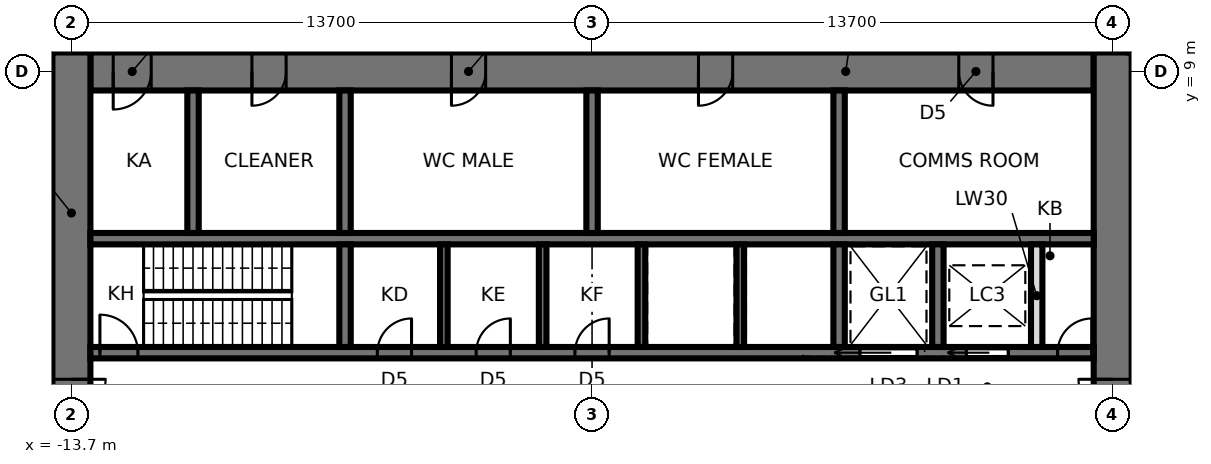
"""IFC4 building model, lengths in metres.
Left out: names, types, materials, properties, quantities, classifications, styles, units other than length and angle.
Written with IfcOpenShell. Run it as: python <this file> out.ifc"""

import sys

from ifc_helpers import new_model, si_unit, direction, frame, frame_2d, origin, place, context, subcontext, project, spatial, rectangle, extrude, element, fill, save


model = new_model("IFC4")
c1 = context("Model", 3, precision=1e-05, world=origin(), true_north=direction((0.0, 1.0)))
c2 = subcontext(c1, "Body", "Model", "MODEL_VIEW")
j1 = project(units=[si_unit("LENGTHUNIT", "METRE"), si_unit("PLANEANGLEUNIT", "RADIAN")], contexts=[c1])
p1 = place(None, origin())
s1 = spatial("IfcSite", under=j1, at=p1, CompositionType="ELEMENT")
p2 = place(p1, origin())
s2 = spatial("IfcBuilding", under=s1, at=p2, CompositionType="ELEMENT")
p3 = place(p2, frame((0.0, 0.0, 166.5)))
s3 = spatial("IfcBuildingStorey", under=s2, at=p3, CompositionType="ELEMENT", Elevation=166.5)
p4 = place(p3, frame((13.2, 9.0, 0.0), z_axis=(0.0, 0.0, 1.0), x_axis=(-1.0, 0.0, 0.0)))
e1 = element("IfcWall", 1, at=p4, inside=s3, PredefinedType="SHEAR", context=c2, shape_type="SweptSolid", body=[
    extrude(rectangle(XDim=26.4, YDim=1.0, at=frame_2d((13.2, 0.0))), origin(), (0.0, 0.0, 1.0), 5.6),
])
p5 = place(p4, frame((2.65, 0.0, 0.0)))
e2 = element("IfcOpeningElement", 2, at=p5, cuts=e1, PredefinedType="OPENING", context=c2, shape_type="SweptSolid", body=[
    extrude(rectangle(XDim=0.9, YDim=2.1, at=frame_2d((0.45, 1.05))), frame((0.0, 0.51, 0.0), z_axis=(0.0, -1.0, 0.0), x_axis=(1.0, 0.0, 0.0)), (0.0, 0.0, 1.0), 1.02),
])
p6 = place(p4, frame((9.5, 0.0, 0.0)))
e3 = element("IfcOpeningElement", 3, at=p6, cuts=e1, PredefinedType="OPENING", context=c2, shape_type="SweptSolid", body=[
    extrude(rectangle(XDim=0.9, YDim=2.1, at=frame_2d((0.45, 1.05))), frame((0.0, 0.51, 0.0), z_axis=(0.0, -1.0, 0.0), x_axis=(1.0, 0.0, 0.0)), (0.0, 0.0, 1.0), 1.02),
])
p7 = place(p4, frame((16.0, 0.0, 0.0)))
e4 = element("IfcOpeningElement", 4, at=p7, cuts=e1, PredefinedType="OPENING", context=c2, shape_type="SweptSolid", body=[
    extrude(rectangle(XDim=0.9, YDim=2.1, at=frame_2d((0.45, 1.05))), frame((0.0, 0.51, 0.0), z_axis=(0.0, -1.0, 0.0), x_axis=(1.0, 0.0, 0.0)), (0.0, 0.0, 1.0), 1.02),
])
p8 = place(p4, frame((21.25, 0.0, 0.0)))
e5 = element("IfcOpeningElement", 5, at=p8, cuts=e1, PredefinedType="OPENING", context=c2, shape_type="SweptSolid", body=[
    extrude(rectangle(XDim=0.9, YDim=2.1, at=frame_2d((0.45, 1.05))), frame((0.0, 0.51, 0.0), z_axis=(0.0, -1.0, 0.0), x_axis=(1.0, 0.0, 0.0)), (0.0, 0.0, 1.0), 1.02),
])
p9 = place(p4, frame((24.8, 0.0, 0.0)))
e6 = element("IfcOpeningElement", 6, at=p9, cuts=e1, PredefinedType="OPENING", context=c2, shape_type="SweptSolid", body=[
    extrude(rectangle(XDim=1.0, YDim=2.1, at=frame_2d((0.5, 1.05))), frame((0.0, 0.51, 0.0), z_axis=(0.0, -1.0, 0.0), x_axis=(1.0, 0.0, 0.0)), (0.0, 0.0, 1.0), 1.02),
])
p10 = place(p3, frame((13.7, -9.5, 0.0), z_axis=(0.0, 0.0, 1.0), x_axis=(0.0, 1.0, 0.0)))
e7 = element("IfcWall", 7, at=p10, inside=s3, PredefinedType="SHEAR", context=c2, shape_type="SweptSolid", body=[
    extrude(rectangle(XDim=19.0, YDim=1.0, at=frame_2d((9.5, 0.0))), origin(), (0.0, 0.0, 1.0), 5.6),
])
p11 = place(p10, frame((8.6, 0.0, 0.0)))
e8 = element("IfcOpeningElement", 8, at=p11, cuts=e7, PredefinedType="OPENING", context=c2, shape_type="SweptSolid", body=[
    extrude(rectangle(XDim=1.8, YDim=2.4, at=frame_2d((0.9, 1.2))), frame((0.0, 0.51, 0.0), z_axis=(0.0, -1.0, 0.0), x_axis=(1.0, 0.0, 0.0)), (0.0, 0.0, 1.0), 1.02),
])
p12 = place(p3, frame((-13.7, 9.5, 0.0), z_axis=(0.0, 0.0, 1.0), x_axis=(0.0, -1.0, 0.0)))
e9 = element("IfcWall", 9, at=p12, inside=s3, PredefinedType="SHEAR", context=c2, shape_type="SweptSolid", body=[
    extrude(rectangle(XDim=19.0, YDim=1.0, at=frame_2d((9.5, 0.0))), origin(), (0.0, 0.0, 1.0), 5.6),
])
p13 = place(p12, frame((8.6, 0.0, 0.0)))
e10 = element("IfcOpeningElement", 10, at=p13, cuts=e9, PredefinedType="OPENING", context=c2, shape_type="SweptSolid", body=[
    extrude(rectangle(XDim=1.8, YDim=2.4, at=frame_2d((0.9, 1.2))), frame((0.0, 0.51, 0.0), z_axis=(0.0, -1.0, 0.0), x_axis=(1.0, 0.0, 0.0)), (0.0, 0.0, 1.0), 1.02),
])
p14 = place(p3, frame((-13.2, 1.6, 0.0), z_axis=(0.0, 0.0, 1.0), x_axis=(1.0, 0.0, 0.0)))
e11 = element("IfcWall", 11, at=p14, inside=s3, PredefinedType="SHEAR", context=c2, shape_type="SweptSolid", body=[
    extrude(rectangle(XDim=26.4, YDim=0.3, at=frame_2d((13.2, 0.0))), origin(), (0.0, 0.0, 1.0), 5.6),
])
p15 = place(p14, frame((0.25, 0.0, 0.0)))
e12 = element("IfcOpeningElement", 12, at=p15, cuts=e11, PredefinedType="OPENING", context=c2, shape_type="SweptSolid", body=[
    extrude(rectangle(XDim=1.0, YDim=2.1, at=frame_2d((0.5, 1.05))), frame((0.0, 0.16, 0.0), z_axis=(0.0, -1.0, 0.0), x_axis=(1.0, 0.0, 0.0)), (0.0, 0.0, 1.0), 0.32),
])
p16 = place(p14, frame((23.05, 0.0, 0.0)))
e13 = element("IfcOpeningElement", 13, at=p16, cuts=e11, PredefinedType="OPENING", context=c2, shape_type="SweptSolid", body=[
    extrude(rectangle(XDim=1.1, YDim=2.3, at=frame_2d((0.55, 1.15))), frame((0.0, 0.16, 0.0), z_axis=(0.0, -1.0, 0.0), x_axis=(1.0, 0.0, 0.0)), (0.0, 0.0, 1.0), 0.32),
])
p17 = place(p14, frame((20.25, 0.0, 0.0)))
e14 = element("IfcOpeningElement", 14, at=p17, cuts=e11, PredefinedType="OPENING", context=c2, shape_type="SweptSolid", body=[
    extrude(rectangle(XDim=1.5, YDim=2.4, at=frame_2d((0.75, 1.2))), frame((0.0, 0.16, 0.0), z_axis=(0.0, -1.0, 0.0), x_axis=(1.0, 0.0, 0.0)), (0.0, 0.0, 1.0), 0.32),
])
p18 = place(p14, frame((7.55, 0.0, 0.0)))
e15 = element("IfcOpeningElement", 15, at=p18, cuts=e11, PredefinedType="OPENING", context=c2, shape_type="SweptSolid", body=[
    extrude(rectangle(XDim=0.9, YDim=2.1, at=frame_2d((0.45, 1.05))), frame((0.0, 0.16, 0.0), z_axis=(0.0, -1.0, 0.0), x_axis=(1.0, 0.0, 0.0)), (0.0, 0.0, 1.0), 0.32),
])
p19 = place(p14, frame((10.15, 0.0, 0.0)))
e16 = element("IfcOpeningElement", 16, at=p19, cuts=e11, PredefinedType="OPENING", context=c2, shape_type="SweptSolid", body=[
    extrude(rectangle(XDim=0.9, YDim=2.1, at=frame_2d((0.45, 1.05))), frame((0.0, 0.16, 0.0), z_axis=(0.0, -1.0, 0.0), x_axis=(1.0, 0.0, 0.0)), (0.0, 0.0, 1.0), 0.32),
])
p20 = place(p14, frame((12.75, 0.0, 0.0)))
e17 = element("IfcOpeningElement", 17, at=p20, cuts=e11, PredefinedType="OPENING", context=c2, shape_type="SweptSolid", body=[
    extrude(rectangle(XDim=0.9, YDim=2.1, at=frame_2d((0.45, 1.05))), frame((0.0, 0.16, 0.0), z_axis=(0.0, -1.0, 0.0), x_axis=(1.0, 0.0, 0.0)), (0.0, 0.0, 1.0), 0.32),
])
p21 = place(p14, frame((25.45, 0.0, 0.0)))
e18 = element("IfcOpeningElement", 18, at=p21, cuts=e11, PredefinedType="OPENING", context=c2, shape_type="SweptSolid", body=[
    extrude(rectangle(XDim=0.9, YDim=2.1, at=frame_2d((0.45, 1.05))), frame((0.0, 0.16, 0.0), z_axis=(0.0, -1.0, 0.0), x_axis=(1.0, 0.0, 0.0)), (0.0, 0.0, 1.0), 0.32),
])
p22 = place(p3, frame((-13.2, 4.6, 0.0), z_axis=(0.0, 0.0, 1.0), x_axis=(1.0, 0.0, 0.0)))
e19 = element("IfcWall", 19, at=p22, inside=s3, PredefinedType="SHEAR", context=c2, shape_type="SweptSolid", body=[
    extrude(rectangle(XDim=26.4, YDim=0.3, at=frame_2d((13.2, 0.0))), origin(), (0.0, 0.0, 1.0), 5.6),
])
p23 = place(p3, frame((-6.5, 1.75, 0.0), z_axis=(0.0, 0.0, 1.0), x_axis=(0.0, 1.0, 0.0)))
e20 = element("IfcWall", 20, at=p23, inside=s3, PredefinedType="SHEAR", context=c2, shape_type="SweptSolid", body=[
    extrude(rectangle(XDim=2.7, YDim=0.3, at=frame_2d((1.35, 0.0))), origin(), (0.0, 0.0, 1.0), 5.6),
])
p24 = place(p3, frame((-6.5, 4.75, 0.0), z_axis=(0.0, 0.0, 1.0), x_axis=(0.0, 1.0, 0.0)))
e21 = element("IfcWall", 21, at=p24, inside=s3, PredefinedType="SHEAR", context=c2, shape_type="SweptSolid", body=[
    extrude(rectangle(XDim=3.75, YDim=0.3, at=frame_2d((1.875, 0.0))), origin(), (0.0, 0.0, 1.0), 5.6),
])
p25 = place(p3, frame((6.5, 1.75, 0.0), z_axis=(0.0, 0.0, 1.0), x_axis=(0.0, 1.0, 0.0)))
e22 = element("IfcWall", 22, at=p25, inside=s3, PredefinedType="SHEAR", context=c2, shape_type="SweptSolid", body=[
    extrude(rectangle(XDim=2.7, YDim=0.3, at=frame_2d((1.35, 0.0))), origin(), (0.0, 0.0, 1.0), 5.6),
])
p26 = place(p3, frame((6.5, 4.75, 0.0), z_axis=(0.0, 0.0, 1.0), x_axis=(0.0, 1.0, 0.0)))
e23 = element("IfcWall", 23, at=p26, inside=s3, PredefinedType="SHEAR", context=c2, shape_type="SweptSolid", body=[
    extrude(rectangle(XDim=3.75, YDim=0.3, at=frame_2d((1.875, 0.0))), origin(), (0.0, 0.0, 1.0), 5.6),
])
for number, where, z_axis, x_axis in (
    (24, (-3.9, 1.75, 0.0), (0.0, 0.0, 1.0), (0.0, 1.0, 0.0)),
    (25, (-1.3, 1.75, 0.0), (0.0, 0.0, 1.0), (0.0, 1.0, 0.0)),
    (26, (1.3, 1.75, 0.0), (0.0, 0.0, 1.0), (0.0, 1.0, 0.0)),
    (27, (3.9, 1.75, 0.0), (0.0, 0.0, 1.0), (0.0, 1.0, 0.0)),
):
    element("IfcWall", number, at=place(p3, frame(where, z_axis=z_axis, x_axis=x_axis)), inside=s3, PredefinedType="SHEAR", context=c2, shape_type="SweptSolid", body=[
        extrude(rectangle(XDim=2.7, YDim=0.2, at=frame_2d((1.35, 0.0))), origin(), (0.0, 0.0, 1.0), 5.6),
    ])
for number, where, z_axis, x_axis in (
    (28, (0.0, 4.75, 0.0), (0.0, 0.0, 1.0), (0.0, 1.0, 0.0)),
    (29, (-10.5, 4.75, 0.0), (0.0, 0.0, 1.0), (0.0, 1.0, 0.0)),
):
    element("IfcWall", number, at=place(p3, frame(where, z_axis=z_axis, x_axis=x_axis)), inside=s3, PredefinedType="SHEAR", context=c2, shape_type="SweptSolid", body=[
        extrude(rectangle(XDim=3.75, YDim=0.3, at=frame_2d((1.875, 0.0))), origin(), (0.0, 0.0, 1.0), 5.6),
    ])
p27 = place(p3, frame((9.1, 1.75, 0.0), z_axis=(0.0, 0.0, 1.0), x_axis=(0.0, 1.0, 0.0)))
e30 = element("IfcWall", 30, at=p27, inside=s3, PredefinedType="SHEAR", context=c2, shape_type="SweptSolid", body=[
    extrude(rectangle(XDim=2.7, YDim=0.3, at=frame_2d((1.35, 0.0))), origin(), (0.0, 0.0, 1.0), 5.6),
])
p28 = place(p3, frame((11.7, 1.75, 0.0), z_axis=(0.0, 0.0, 1.0), x_axis=(0.0, 1.0, 0.0)))
e31 = element("IfcWall", 31, at=p28, inside=s3, PredefinedType="SOLIDWALL", context=c2, shape_type="SweptSolid", body=[
    extrude(rectangle(XDim=2.7, YDim=0.3, at=frame_2d((1.35, 0.0))), origin(), (0.0, 0.0, 1.0), 5.4),
])
p29 = place(p3, frame((14.2, 9.5, 0.0), z_axis=(0.0, 0.0, 1.0), x_axis=(0.0, 1.0, 0.0)))
e32 = element("IfcWall", 32, at=p29, inside=s3, PredefinedType="PARTITIONING", context=c2, shape_type="SweptSolid", body=[
    extrude(rectangle(XDim=1.8, YDim=0.15, at=frame_2d((0.9, 0.0))), origin(), (0.0, 0.0, 1.0), 5.4),
])
p30 = place(p13, origin())
e33 = element("IfcDoor", 33, at=p30, inside=s3, OperationType="DOUBLE_DOOR_SINGLE_SWING", PredefinedType="DOOR", context=c2, shape_type="SweptSolid", body=[
    extrude(rectangle(XDim=1.72, YDim=2.36, at=frame_2d((0.9, 1.18))), frame((0.0, 0.025, 0.0), z_axis=(0.0, -1.0, 0.0), x_axis=(1.0, 0.0, 0.0)), (0.0, 0.0, 1.0), 0.05),
    extrude(rectangle(XDim=0.04, YDim=2.4, at=frame_2d((0.02, 1.2))), frame((0.0, 0.25, 0.0), z_axis=(0.0, -1.0, 0.0), x_axis=(1.0, 0.0, 0.0)), (0.0, 0.0, 1.0), 0.5),
    extrude(rectangle(XDim=0.04, YDim=2.4, at=frame_2d((1.78, 1.2))), frame((0.0, 0.25, 0.0), z_axis=(0.0, -1.0, 0.0), x_axis=(1.0, 0.0, 0.0)), (0.0, 0.0, 1.0), 0.5),
    extrude(rectangle(XDim=1.72, YDim=0.04, at=frame_2d((0.9, 2.38))), frame((0.0, 0.25, 0.0), z_axis=(0.0, -1.0, 0.0), x_axis=(1.0, 0.0, 0.0)), (0.0, 0.0, 1.0), 0.5),
])
fill(e10, e33)
p31 = place(p11, origin())
e34 = element("IfcDoor", 34, at=p31, inside=s3, OperationType="DOUBLE_DOOR_SINGLE_SWING", PredefinedType="DOOR", context=c2, shape_type="SweptSolid", body=[
    extrude(rectangle(XDim=1.72, YDim=2.36, at=frame_2d((0.9, 1.18))), frame((0.0, 0.025, 0.0), z_axis=(0.0, -1.0, 0.0), x_axis=(1.0, 0.0, 0.0)), (0.0, 0.0, 1.0), 0.05),
    extrude(rectangle(XDim=0.04, YDim=2.4, at=frame_2d((0.02, 1.2))), frame((0.0, 0.25, 0.0), z_axis=(0.0, -1.0, 0.0), x_axis=(1.0, 0.0, 0.0)), (0.0, 0.0, 1.0), 0.5),
    extrude(rectangle(XDim=0.04, YDim=2.4, at=frame_2d((1.78, 1.2))), frame((0.0, 0.25, 0.0), z_axis=(0.0, -1.0, 0.0), x_axis=(1.0, 0.0, 0.0)), (0.0, 0.0, 1.0), 0.5),
    extrude(rectangle(XDim=1.72, YDim=0.04, at=frame_2d((0.9, 2.38))), frame((0.0, 0.25, 0.0), z_axis=(0.0, -1.0, 0.0), x_axis=(1.0, 0.0, 0.0)), (0.0, 0.0, 1.0), 0.5),
])
fill(e8, e34)
p32 = place(p15, origin())
e35 = element("IfcDoor", 35, at=p32, inside=s3, OperationType="SINGLE_SWING_LEFT", PredefinedType="DOOR", context=c2, shape_type="SweptSolid", body=[
    extrude(rectangle(XDim=1.0, YDim=2.1, at=frame_2d((0.5, 1.05))), frame((0.0, 0.025, 0.0), z_axis=(0.0, -1.0, 0.0), x_axis=(1.0, 0.0, 0.0)), (0.0, 0.0, 1.0), 0.05),
])
fill(e12, e35)
p33 = place(p16, origin())
e36 = element("IfcDoor", 36, at=p33, inside=s3, OperationType="SLIDING_TO_LEFT", PredefinedType="DOOR", context=c2, shape_type="SweptSolid", body=[
    extrude(rectangle(XDim=1.1, YDim=2.3, at=frame_2d((0.55, 1.15))), frame((0.0, 0.025, 0.0), z_axis=(0.0, -1.0, 0.0), x_axis=(1.0, 0.0, 0.0)), (0.0, 0.0, 1.0), 0.05),
])
fill(e13, e36)
p34 = place(p17, origin())
e37 = element("IfcDoor", 37, at=p34, inside=s3, OperationType="SLIDING_TO_LEFT", PredefinedType="DOOR", context=c2, shape_type="SweptSolid", body=[
    extrude(rectangle(XDim=1.5, YDim=2.4, at=frame_2d((0.75, 1.2))), frame((0.0, 0.025, 0.0), z_axis=(0.0, -1.0, 0.0), x_axis=(1.0, 0.0, 0.0)), (0.0, 0.0, 1.0), 0.05),
])
fill(e14, e37)
p35 = place(p18, origin())
e38 = element("IfcDoor", 38, at=p35, inside=s3, OperationType="SINGLE_SWING_RIGHT", PredefinedType="DOOR", context=c2, shape_type="SweptSolid", body=[
    extrude(rectangle(XDim=0.9, YDim=2.1, at=frame_2d((0.45, 1.05))), frame((0.0, 0.025, 0.0), z_axis=(0.0, -1.0, 0.0), x_axis=(1.0, 0.0, 0.0)), (0.0, 0.0, 1.0), 0.05),
])
fill(e15, e38)
p36 = place(p19, origin())
e39 = element("IfcDoor", 39, at=p36, inside=s3, OperationType="SINGLE_SWING_RIGHT", PredefinedType="DOOR", context=c2, shape_type="SweptSolid", body=[
    extrude(rectangle(XDim=0.9, YDim=2.1, at=frame_2d((0.45, 1.05))), frame((0.0, 0.025, 0.0), z_axis=(0.0, -1.0, 0.0), x_axis=(1.0, 0.0, 0.0)), (0.0, 0.0, 1.0), 0.05),
])
fill(e16, e39)
p37 = place(p20, origin())
e40 = element("IfcDoor", 40, at=p37, inside=s3, OperationType="SINGLE_SWING_RIGHT", PredefinedType="DOOR", context=c2, shape_type="SweptSolid", body=[
    extrude(rectangle(XDim=0.9, YDim=2.1, at=frame_2d((0.45, 1.05))), frame((0.0, 0.025, 0.0), z_axis=(0.0, -1.0, 0.0), x_axis=(1.0, 0.0, 0.0)), (0.0, 0.0, 1.0), 0.05),
])
fill(e17, e40)
p38 = place(p21, origin())
e41 = element("IfcDoor", 41, at=p38, inside=s3, OperationType="SINGLE_SWING_RIGHT", PredefinedType="DOOR", context=c2, shape_type="SweptSolid", body=[
    extrude(rectangle(XDim=0.9, YDim=2.1, at=frame_2d((0.45, 1.05))), frame((0.0, 0.025, 0.0), z_axis=(0.0, -1.0, 0.0), x_axis=(1.0, 0.0, 0.0)), (0.0, 0.0, 1.0), 0.05),
])
fill(e18, e41)
p39 = place(p5, origin())
e42 = element("IfcDoor", 42, at=p39, inside=s3, OperationType="SINGLE_SWING_LEFT", PredefinedType="DOOR", context=c2, shape_type="SweptSolid", body=[
    extrude(rectangle(XDim=0.82, YDim=2.06, at=frame_2d((0.45, 1.03))), frame((0.0, 0.025, 0.0), z_axis=(0.0, -1.0, 0.0), x_axis=(1.0, 0.0, 0.0)), (0.0, 0.0, 1.0), 0.05),
    extrude(rectangle(XDim=0.04, YDim=2.1, at=frame_2d((0.02, 1.05))), frame((0.0, 0.25, 0.0), z_axis=(0.0, -1.0, 0.0), x_axis=(1.0, 0.0, 0.0)), (0.0, 0.0, 1.0), 0.5),
    extrude(rectangle(XDim=0.04, YDim=2.1, at=frame_2d((0.88, 1.05))), frame((0.0, 0.25, 0.0), z_axis=(0.0, -1.0, 0.0), x_axis=(1.0, 0.0, 0.0)), (0.0, 0.0, 1.0), 0.5),
    extrude(rectangle(XDim=0.82, YDim=0.04, at=frame_2d((0.45, 2.08))), frame((0.0, 0.25, 0.0), z_axis=(0.0, -1.0, 0.0), x_axis=(1.0, 0.0, 0.0)), (0.0, 0.0, 1.0), 0.5),
])
fill(e2, e42)
p40 = place(p6, origin())
e43 = element("IfcDoor", 43, at=p40, inside=s3, OperationType="SINGLE_SWING_RIGHT", PredefinedType="DOOR", context=c2, shape_type="SweptSolid", body=[
    extrude(rectangle(XDim=0.82, YDim=2.06, at=frame_2d((0.45, 1.03))), frame((0.0, 0.025, 0.0), z_axis=(0.0, -1.0, 0.0), x_axis=(1.0, 0.0, 0.0)), (0.0, 0.0, 1.0), 0.05),
    extrude(rectangle(XDim=0.04, YDim=2.1, at=frame_2d((0.02, 1.05))), frame((0.0, 0.25, 0.0), z_axis=(0.0, -1.0, 0.0), x_axis=(1.0, 0.0, 0.0)), (0.0, 0.0, 1.0), 0.5),
    extrude(rectangle(XDim=0.04, YDim=2.1, at=frame_2d((0.88, 1.05))), frame((0.0, 0.25, 0.0), z_axis=(0.0, -1.0, 0.0), x_axis=(1.0, 0.0, 0.0)), (0.0, 0.0, 1.0), 0.5),
    extrude(rectangle(XDim=0.82, YDim=0.04, at=frame_2d((0.45, 2.08))), frame((0.0, 0.25, 0.0), z_axis=(0.0, -1.0, 0.0), x_axis=(1.0, 0.0, 0.0)), (0.0, 0.0, 1.0), 0.5),
])
fill(e3, e43)
p41 = place(p7, origin())
e44 = element("IfcDoor", 44, at=p41, inside=s3, OperationType="SINGLE_SWING_RIGHT", PredefinedType="DOOR", context=c2, shape_type="SweptSolid", body=[
    extrude(rectangle(XDim=0.82, YDim=2.06, at=frame_2d((0.45, 1.03))), frame((0.0, 0.025, 0.0), z_axis=(0.0, -1.0, 0.0), x_axis=(1.0, 0.0, 0.0)), (0.0, 0.0, 1.0), 0.05),
    extrude(rectangle(XDim=0.04, YDim=2.1, at=frame_2d((0.02, 1.05))), frame((0.0, 0.25, 0.0), z_axis=(0.0, -1.0, 0.0), x_axis=(1.0, 0.0, 0.0)), (0.0, 0.0, 1.0), 0.5),
    extrude(rectangle(XDim=0.04, YDim=2.1, at=frame_2d((0.88, 1.05))), frame((0.0, 0.25, 0.0), z_axis=(0.0, -1.0, 0.0), x_axis=(1.0, 0.0, 0.0)), (0.0, 0.0, 1.0), 0.5),
    extrude(rectangle(XDim=0.82, YDim=0.04, at=frame_2d((0.45, 2.08))), frame((0.0, 0.25, 0.0), z_axis=(0.0, -1.0, 0.0), x_axis=(1.0, 0.0, 0.0)), (0.0, 0.0, 1.0), 0.5),
])
fill(e4, e44)
p42 = place(p8, origin())
e45 = element("IfcDoor", 45, at=p42, inside=s3, OperationType="SINGLE_SWING_RIGHT", PredefinedType="DOOR", context=c2, shape_type="SweptSolid", body=[
    extrude(rectangle(XDim=0.82, YDim=2.06, at=frame_2d((0.45, 1.03))), frame((0.0, 0.025, 0.0), z_axis=(0.0, -1.0, 0.0), x_axis=(1.0, 0.0, 0.0)), (0.0, 0.0, 1.0), 0.05),
    extrude(rectangle(XDim=0.04, YDim=2.1, at=frame_2d((0.02, 1.05))), frame((0.0, 0.25, 0.0), z_axis=(0.0, -1.0, 0.0), x_axis=(1.0, 0.0, 0.0)), (0.0, 0.0, 1.0), 0.5),
    extrude(rectangle(XDim=0.04, YDim=2.1, at=frame_2d((0.88, 1.05))), frame((0.0, 0.25, 0.0), z_axis=(0.0, -1.0, 0.0), x_axis=(1.0, 0.0, 0.0)), (0.0, 0.0, 1.0), 0.5),
    extrude(rectangle(XDim=0.82, YDim=0.04, at=frame_2d((0.45, 2.08))), frame((0.0, 0.25, 0.0), z_axis=(0.0, -1.0, 0.0), x_axis=(1.0, 0.0, 0.0)), (0.0, 0.0, 1.0), 0.5),
])
fill(e5, e45)
p43 = place(p9, origin())
e46 = element("IfcDoor", 46, at=p43, inside=s3, OperationType="SINGLE_SWING_RIGHT", PredefinedType="DOOR", context=c2, shape_type="SweptSolid", body=[
    extrude(rectangle(XDim=0.92, YDim=2.06, at=frame_2d((0.5, 1.03))), frame((0.0, 0.025, 0.0), z_axis=(0.0, -1.0, 0.0), x_axis=(1.0, 0.0, 0.0)), (0.0, 0.0, 1.0), 0.05),
    extrude(rectangle(XDim=0.04, YDim=2.1, at=frame_2d((0.02, 1.05))), frame((0.0, 0.25, 0.0), z_axis=(0.0, -1.0, 0.0), x_axis=(1.0, 0.0, 0.0)), (0.0, 0.0, 1.0), 0.5),
    extrude(rectangle(XDim=0.04, YDim=2.1, at=frame_2d((0.98, 1.05))), frame((0.0, 0.25, 0.0), z_axis=(0.0, -1.0, 0.0), x_axis=(1.0, 0.0, 0.0)), (0.0, 0.0, 1.0), 0.5),
    extrude(rectangle(XDim=0.92, YDim=0.04, at=frame_2d((0.5, 2.08))), frame((0.0, 0.25, 0.0), z_axis=(0.0, -1.0, 0.0), x_axis=(1.0, 0.0, 0.0)), (0.0, 0.0, 1.0), 0.5),
])
fill(e6, e46)
save(model, sys.argv[1])
